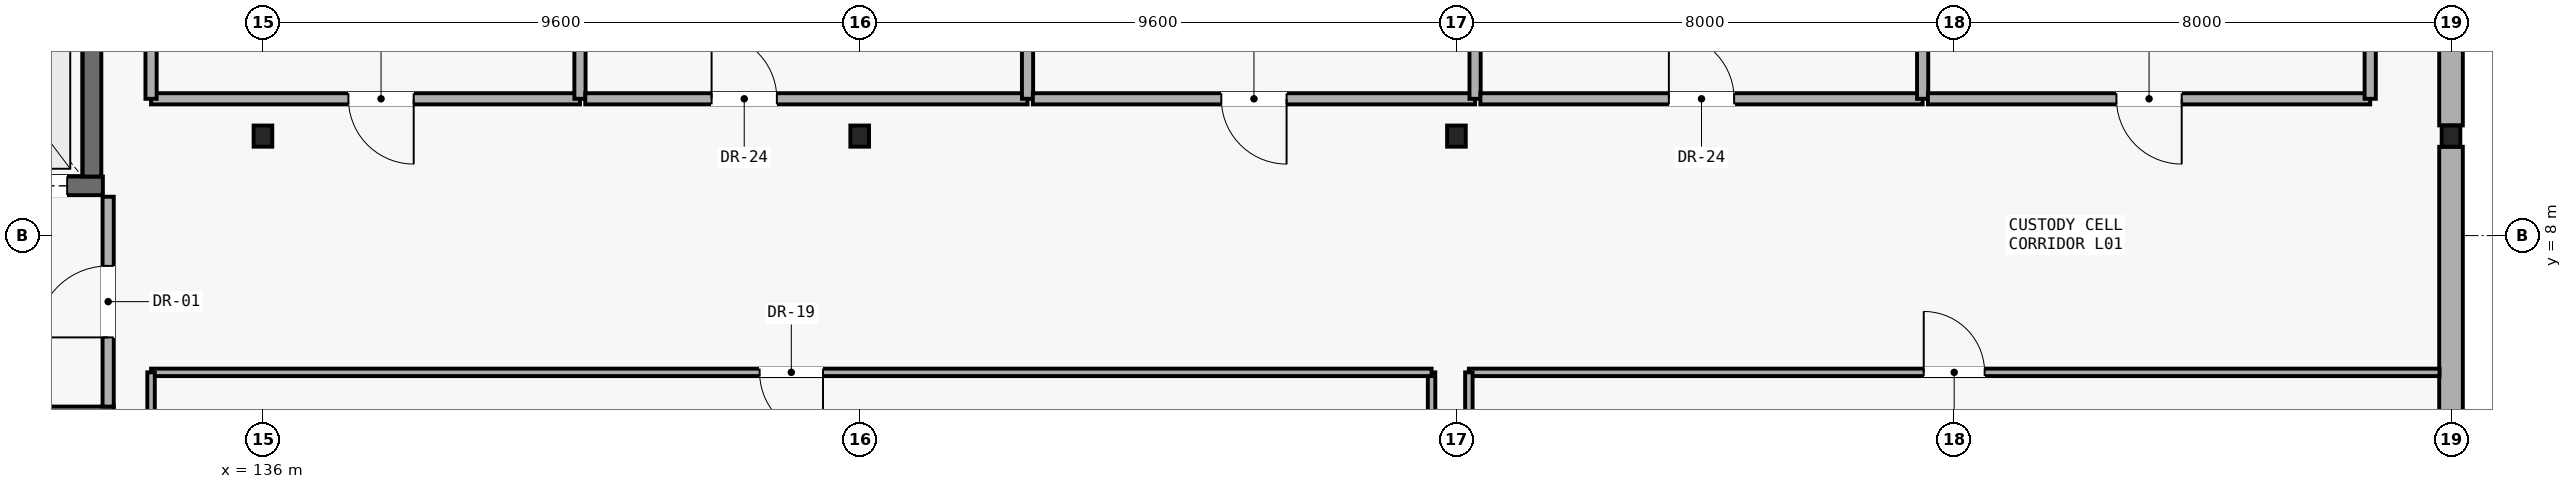
"""IFC4 building model, lengths in metres.
Left out: names, types, materials, properties, quantities, classifications, styles, units other than length and angle.
Written with IfcOpenShell. Run it as: python <this file> out.ifc"""

import sys

from ifc_helpers import new_model, si_unit, direction, frame, frame_2d, origin, origin_2d, place, context, subcontext, project, spatial, rectangle, i_section, extrude, element, fill, save


model = new_model("IFC4")
c1 = context("Model", 3, precision=1e-05, world=origin(), true_north=direction((0.0, 1.0)))
c2 = subcontext(c1, "Body", "Model", "MODEL_VIEW")
j1 = project(units=[si_unit("LENGTHUNIT", "METRE"), si_unit("PLANEANGLEUNIT", "RADIAN")], contexts=[c1])
p1 = place(None, origin())
s1 = spatial("IfcSite", under=j1, at=p1, CompositionType="ELEMENT")
p2 = place(p1, origin())
s2 = spatial("IfcBuilding", under=s1, at=p2, CompositionType="ELEMENT")
p3 = place(p2, frame((0.0, 0.0, 5.25)))
s3 = spatial("IfcBuildingStorey", under=s2, at=p3, CompositionType="ELEMENT", Elevation=5.25)
for number, where, z_axis, x_axis in (
    (1, (136.0, 9.6, 0.0), (0.0, 0.0, 1.0), (1.0, 0.0, 0.0)),
    (2, (145.6, 9.6, 0.0), (0.0, 0.0, 1.0), (1.0, 0.0, 0.0)),
    (3, (155.2, 9.6, 0.0), (0.0, 0.0, 1.0), (1.0, 0.0, 0.0)),
    (4, (171.2, 9.6, 0.0), (0.0, 0.0, 1.0), (1.0, 0.0, 0.0)),
):
    element("IfcColumn", number, at=place(p3, frame(where, z_axis=z_axis, x_axis=x_axis)), inside=s3, PredefinedType="COLUMN", context=c2, shape_type="SweptSolid", body=[
        extrude(i_section(OverallWidth=0.3, OverallDepth=0.34, WebThickness=0.012, FlangeThickness=0.021, FilletRadius=0.027, at=origin_2d()), origin(), (0.0, 0.0, 1.0), 4.2),
    ])
p4 = place(p3, frame((171.2, 0.172, 0.0), z_axis=(0.0, 0.0, 1.0), x_axis=(0.0, 1.0, 0.0)))
e5 = element("IfcWall", 5, at=p4, inside=s3, PredefinedType="SOLIDWALL", context=c2, shape_type="SweptSolid", body=[
    extrude(rectangle(XDim=9.256, YDim=0.38, at=frame_2d((4.628, 0.0))), origin(), (0.0, 0.0, 1.0), 3.5),
])
p5 = place(p3, frame((171.2, 9.772, 0.0), z_axis=(0.0, 0.0, 1.0), x_axis=(0.0, 1.0, 0.0)))
e6 = element("IfcWall", 6, at=p5, inside=s3, PredefinedType="SOLIDWALL", context=c2, shape_type="SweptSolid", body=[
    extrude(rectangle(XDim=12.456, YDim=0.38, at=frame_2d((6.228, 0.0))), origin(), (0.0, 0.0, 1.0), 3.5),
])
p6 = place(p5, frame((3.528, 0.0, 1.7)))
e7 = element("IfcOpeningElement", 7, at=p6, cuts=e6, PredefinedType="OPENING", context=c2, shape_type="SweptSolid", body=[
    extrude(rectangle(XDim=1.4, YDim=0.85, at=frame_2d((0.7, 0.425))), frame((0.0, 0.2, 0.0), z_axis=(0.0, -1.0, 0.0), x_axis=(1.0, 0.0, 0.0)), (0.0, 0.0, 1.0), 0.4),
])
p7 = place(p5, frame((8.578, 0.0, 1.7)))
e8 = element("IfcOpeningElement", 8, at=p7, cuts=e6, PredefinedType="OPENING", context=c2, shape_type="SweptSolid", body=[
    extrude(rectangle(XDim=1.4, YDim=0.85, at=frame_2d((0.7, 0.425))), frame((0.0, 0.2, 0.0), z_axis=(0.0, -1.0, 0.0), x_axis=(1.0, 0.0, 0.0)), (0.0, 0.0, 1.0), 0.4),
])
p8 = place(p3, frame((130.925, 8.8, 0.0), z_axis=(0.0, 0.0, 1.0), x_axis=(1.0, 0.0, 0.0)))
e9 = element("IfcWall", 9, at=p8, inside=s3, PredefinedType="SHEAR", context=c2, shape_type="SweptSolid", body=[
    extrude(rectangle(XDim=2.5, YDim=0.3, at=frame_2d((1.25, 0.0))), origin(), (0.0, 0.0, 1.0), 3.96),
])
p9 = place(p8, frame((0.575, 0.0, 0.0)))
e10 = element("IfcOpeningElement", 10, at=p9, cuts=e9, PredefinedType="OPENING", context=c2, shape_type="SweptSolid", body=[
    extrude(rectangle(XDim=1.35, YDim=2.15, at=frame_2d((0.675, 1.075))), frame((0.0, 0.16, 0.0), z_axis=(0.0, -1.0, 0.0), x_axis=(1.0, 0.0, 0.0)), (0.0, 0.0, 1.0), 0.32),
])
p10 = place(p3, frame((133.25, 8.95, 0.0), z_axis=(0.0, 0.0, 1.0), x_axis=(0.0, 1.0, 0.0)))
e11 = element("IfcWall", 11, at=p10, inside=s3, PredefinedType="SHEAR", context=c2, shape_type="SweptSolid", body=[
    extrude(rectangle(XDim=2.65, YDim=0.3, at=frame_2d((1.325, 0.0))), origin(), (0.0, 0.0, 1.0), 3.96),
])
p11 = place(p3, frame((127.2, 5.16, 0.0), z_axis=(0.0, 0.0, 1.0), x_axis=(1.0, 0.0, 0.0)))
e12 = element("IfcWall", 12, at=p11, inside=s3, PredefinedType="PARTITIONING", context=c2, shape_type="SweptSolid", body=[
    extrude(rectangle(XDim=6.4, YDim=0.18, at=frame_2d((3.2, 0.0))), origin(), (0.0, 0.0, 1.0), 3.96),
])
p12 = place(p3, frame((133.51, 5.25, 0.0), z_axis=(0.0, 0.0, 1.0), x_axis=(0.0, 1.0, 0.0)))
e13 = element("IfcWall", 13, at=p12, inside=s3, PredefinedType="PARTITIONING", context=c2, shape_type="SweptSolid", body=[
    extrude(rectangle(XDim=3.375, YDim=0.18, at=frame_2d((1.688, 0.0))), origin(), (0.0, 0.0, 1.0), 3.96),
])
p13 = place(p12, frame((1.113, 0.0, 0.0)))
e14 = element("IfcOpeningElement", 14, at=p13, cuts=e13, PredefinedType="OPENING", context=c2, shape_type="SweptSolid", body=[
    extrude(rectangle(XDim=1.15, YDim=2.15, at=frame_2d((0.575, 1.075))), frame((0.0, 0.1, 0.0), z_axis=(0.0, -1.0, 0.0), x_axis=(1.0, 0.0, 0.0)), (0.0, 0.0, 1.0), 0.2),
])
p14 = place(p3, frame((134.2, 10.2, 0.0), z_axis=(0.0, 0.0, 1.0), x_axis=(1.0, 0.0, 0.0)))
e15 = element("IfcWall", 15, at=p14, inside=s3, PredefinedType="PARTITIONING", context=c2, shape_type="SweptSolid", body=[
    extrude(rectangle(XDim=6.9, YDim=0.18, at=frame_2d((3.45, 0.0))), origin(), (0.0, 0.0, 1.0), 3.96),
])
p15 = place(p14, frame((3.175, 0.0, 0.0)))
e16 = element("IfcOpeningElement", 16, at=p15, cuts=e15, PredefinedType="OPENING", context=c2, shape_type="SweptSolid", body=[
    extrude(rectangle(XDim=1.05, YDim=2.1, at=frame_2d((0.525, 1.05))), frame((0.0, 0.1, 0.0), z_axis=(0.0, -1.0, 0.0), x_axis=(1.0, 0.0, 0.0)), (0.0, 0.0, 1.0), 0.2),
])
for number, where, z_axis, x_axis in (
    (17, (141.1, 10.2, 0.0), (0.0, 0.0, 1.0), (0.0, 1.0, 0.0)),
    (18, (134.2, 22.215, 0.0), (0.0, 0.0, 1.0), (0.0, -1.0, 0.0)),
):
    element("IfcWall", number, at=place(p3, frame(where, z_axis=z_axis, x_axis=x_axis)), inside=s3, PredefinedType="PARTITIONING", context=c2, shape_type="SweptSolid", body=[
        extrude(rectangle(XDim=12.015, YDim=0.18, at=frame_2d((6.008, 0.0))), origin(), (0.0, 0.0, 1.0), 3.96),
    ])
p16 = place(p3, frame((141.185, 10.2, 0.0), z_axis=(0.0, 0.0, 1.0), x_axis=(1.0, 0.0, 0.0)))
e19 = element("IfcWall", 19, at=p16, inside=s3, PredefinedType="PARTITIONING", context=c2, shape_type="SweptSolid", body=[
    extrude(rectangle(XDim=7.115, YDim=0.18, at=frame_2d((3.558, 0.0))), origin(), (0.0, 0.0, 1.0), 3.96),
])
p17 = place(p16, frame((2.032, 0.0, 0.0)))
e20 = element("IfcOpeningElement", 20, at=p17, cuts=e19, PredefinedType="OPENING", context=c2, shape_type="SweptSolid", body=[
    extrude(rectangle(XDim=1.05, YDim=2.1, at=frame_2d((0.525, 1.05))), frame((0.0, 0.1, 0.0), z_axis=(0.0, -1.0, 0.0), x_axis=(1.0, 0.0, 0.0)), (0.0, 0.0, 1.0), 0.2),
])
p18 = place(p3, frame((148.3, 10.2, 0.0), z_axis=(0.0, 0.0, 1.0), x_axis=(0.0, 1.0, 0.0)))
e21 = element("IfcWall", 21, at=p18, inside=s3, PredefinedType="PARTITIONING", context=c2, shape_type="SweptSolid", body=[
    extrude(rectangle(XDim=12.015, YDim=0.18, at=frame_2d((6.008, 0.0))), origin(), (0.0, 0.0, 1.0), 3.96),
])
p19 = place(p3, frame((148.385, 10.2, 0.0), z_axis=(0.0, 0.0, 1.0), x_axis=(1.0, 0.0, 0.0)))
e22 = element("IfcWall", 22, at=p19, inside=s3, PredefinedType="PARTITIONING", context=c2, shape_type="SweptSolid", body=[
    extrude(rectangle(XDim=7.115, YDim=0.18, at=frame_2d((3.558, 0.0))), origin(), (0.0, 0.0, 1.0), 3.96),
])
p20 = place(p19, frame((3.032, 0.0, 0.0)))
e23 = element("IfcOpeningElement", 23, at=p20, cuts=e22, PredefinedType="OPENING", context=c2, shape_type="SweptSolid", body=[
    extrude(rectangle(XDim=1.05, YDim=2.1, at=frame_2d((0.525, 1.05))), frame((0.0, 0.1, 0.0), z_axis=(0.0, -1.0, 0.0), x_axis=(1.0, 0.0, 0.0)), (0.0, 0.0, 1.0), 0.2),
])
p21 = place(p3, frame((155.5, 10.2, 0.0), z_axis=(0.0, 0.0, 1.0), x_axis=(0.0, 1.0, 0.0)))
e24 = element("IfcWall", 24, at=p21, inside=s3, PredefinedType="PARTITIONING", context=c2, shape_type="SweptSolid", body=[
    extrude(rectangle(XDim=12.015, YDim=0.18, at=frame_2d((6.008, 0.0))), origin(), (0.0, 0.0, 1.0), 3.5),
])
p22 = place(p3, frame((155.585, 10.2, 0.0), z_axis=(0.0, 0.0, 1.0), x_axis=(1.0, 0.0, 0.0)))
e25 = element("IfcWall", 25, at=p22, inside=s3, PredefinedType="PARTITIONING", context=c2, shape_type="SweptSolid", body=[
    extrude(rectangle(XDim=7.115, YDim=0.18, at=frame_2d((3.558, 0.0))), origin(), (0.0, 0.0, 1.0), 3.96),
])
p23 = place(p22, frame((3.032, 0.0, 0.0)))
e26 = element("IfcOpeningElement", 26, at=p23, cuts=e25, PredefinedType="OPENING", context=c2, shape_type="SweptSolid", body=[
    extrude(rectangle(XDim=1.05, YDim=2.1, at=frame_2d((0.525, 1.05))), frame((0.0, 0.1, 0.0), z_axis=(0.0, -1.0, 0.0), x_axis=(1.0, 0.0, 0.0)), (0.0, 0.0, 1.0), 0.2),
])
p24 = place(p3, frame((162.7, 10.2, 0.0), z_axis=(0.0, 0.0, 1.0), x_axis=(0.0, 1.0, 0.0)))
e27 = element("IfcWall", 27, at=p24, inside=s3, PredefinedType="PARTITIONING", context=c2, shape_type="SweptSolid", body=[
    extrude(rectangle(XDim=12.015, YDim=0.18, at=frame_2d((6.008, 0.0))), origin(), (0.0, 0.0, 1.0), 3.96),
])
p25 = place(p3, frame((162.785, 10.2, 0.0), z_axis=(0.0, 0.0, 1.0), x_axis=(1.0, 0.0, 0.0)))
e28 = element("IfcWall", 28, at=p25, inside=s3, PredefinedType="PARTITIONING", context=c2, shape_type="SweptSolid", body=[
    extrude(rectangle(XDim=7.115, YDim=0.18, at=frame_2d((3.558, 0.0))), origin(), (0.0, 0.0, 1.0), 3.96),
])
p26 = place(p25, frame((3.032, 0.0, 0.0)))
e29 = element("IfcOpeningElement", 29, at=p26, cuts=e28, PredefinedType="OPENING", context=c2, shape_type="SweptSolid", body=[
    extrude(rectangle(XDim=1.05, YDim=2.1, at=frame_2d((0.525, 1.05))), frame((0.0, 0.1, 0.0), z_axis=(0.0, -1.0, 0.0), x_axis=(1.0, 0.0, 0.0)), (0.0, 0.0, 1.0), 0.2),
])
p27 = place(p3, frame((169.9, 10.2, 0.0), z_axis=(0.0, 0.0, 1.0), x_axis=(0.0, 1.0, 0.0)))
e30 = element("IfcWall", 30, at=p27, inside=s3, PredefinedType="PARTITIONING", context=c2, shape_type="SweptSolid", body=[
    extrude(rectangle(XDim=12.015, YDim=0.18, at=frame_2d((6.008, 0.0))), origin(), (0.0, 0.0, 1.0), 3.96),
])
p28 = place(p3, frame((154.8, 0.185, 0.0), z_axis=(0.0, 0.0, 1.0), x_axis=(0.0, 1.0, 0.0)))
e31 = element("IfcWall", 31, at=p28, inside=s3, PredefinedType="PARTITIONING", context=c2, shape_type="SweptSolid", body=[
    extrude(rectangle(XDim=5.615, YDim=0.12, at=frame_2d((2.808, 0.0))), origin(), (0.0, 0.0, 1.0), 3.96),
])
p29 = place(p3, frame((154.8, 5.8, 0.0), z_axis=(0.0, 0.0, 1.0), x_axis=(-1.0, 0.0, 0.0)))
e32 = element("IfcWall", 32, at=p29, inside=s3, PredefinedType="PARTITIONING", context=c2, shape_type="SweptSolid", body=[
    extrude(rectangle(XDim=20.6, YDim=0.12, at=frame_2d((10.3, 0.0))), origin(), (0.0, 0.0, 1.0), 3.96),
])
p30 = place(p29, frame((9.79, 0.0, 0.0)))
e33 = element("IfcOpeningElement", 33, at=p30, cuts=e32, PredefinedType="OPENING", context=c2, shape_type="SweptSolid", body=[
    extrude(rectangle(XDim=1.02, YDim=2.1, at=frame_2d((0.51, 1.05))), frame((0.0, 0.07, 0.0), z_axis=(0.0, -1.0, 0.0), x_axis=(1.0, 0.0, 0.0)), (0.0, 0.0, 1.0), 0.14),
])
p31 = place(p3, frame((134.2, 5.8, 0.0), z_axis=(0.0, 0.0, 1.0), x_axis=(0.0, -1.0, 0.0)))
e34 = element("IfcWall", 34, at=p31, inside=s3, PredefinedType="PARTITIONING", context=c2, shape_type="SweptSolid", body=[
    extrude(rectangle(XDim=5.615, YDim=0.12, at=frame_2d((2.808, 0.0))), origin(), (0.0, 0.0, 1.0), 3.96),
])
p32 = place(p3, frame((171.015, 5.8, 0.0), z_axis=(0.0, 0.0, 1.0), x_axis=(-1.0, 0.0, 0.0)))
e35 = element("IfcWall", 35, at=p32, inside=s3, PredefinedType="PARTITIONING", context=c2, shape_type="SweptSolid", body=[
    extrude(rectangle(XDim=15.615, YDim=0.12, at=frame_2d((7.808, 0.0))), origin(), (0.0, 0.0, 1.0), 3.96),
])
p33 = place(p32, frame((7.317, 0.0, 0.0)))
e36 = element("IfcOpeningElement", 36, at=p33, cuts=e35, PredefinedType="OPENING", context=c2, shape_type="SweptSolid", body=[
    extrude(rectangle(XDim=0.98, YDim=2.1, at=frame_2d((0.49, 1.05))), frame((0.0, 0.07, 0.0), z_axis=(0.0, -1.0, 0.0), x_axis=(1.0, 0.0, 0.0)), (0.0, 0.0, 1.0), 0.14),
])
p34 = place(p3, frame((155.4, 5.8, 0.0), z_axis=(0.0, 0.0, 1.0), x_axis=(0.0, -1.0, 0.0)))
e37 = element("IfcWall", 37, at=p34, inside=s3, PredefinedType="PARTITIONING", context=c2, shape_type="SweptSolid", body=[
    extrude(rectangle(XDim=5.615, YDim=0.12, at=frame_2d((2.808, 0.0))), origin(), (0.0, 0.0, 1.0), 3.5),
])
p35 = place(p9, frame((1.35, 0.0, 0.0), z_axis=(0.0, 0.0, 1.0), x_axis=(-1.0, 0.0, 0.0)))
e38 = element("IfcDoor", 38, at=p35, inside=s3, OperationType="SLIDING_TO_RIGHT", PredefinedType="DOOR", context=c2, shape_type="SweptSolid", body=[
    extrude(rectangle(XDim=1.35, YDim=2.15, at=frame_2d((0.675, 1.075))), frame((0.0, 0.025, 0.0), z_axis=(0.0, -1.0, 0.0), x_axis=(1.0, 0.0, 0.0)), (0.0, 0.0, 1.0), 0.05),
])
fill(e10, e38)
p36 = place(p13, origin())
e39 = element("IfcDoor", 39, at=p36, inside=s3, OperationType="SINGLE_SWING_LEFT", PredefinedType="DOOR", context=c2, shape_type="SweptSolid", body=[
    extrude(rectangle(XDim=1.15, YDim=2.15, at=frame_2d((0.575, 1.075))), frame((0.0, 0.025, 0.0), z_axis=(0.0, -1.0, 0.0), x_axis=(1.0, 0.0, 0.0)), (0.0, 0.0, 1.0), 0.05),
])
fill(e14, e39)
p37 = place(p15, frame((1.05, 0.0, 0.0), z_axis=(0.0, 0.0, 1.0), x_axis=(-1.0, 0.0, 0.0)))
e40 = element("IfcDoor", 40, at=p37, inside=s3, OperationType="SINGLE_SWING_RIGHT", PredefinedType="DOOR", context=c2, shape_type="SweptSolid", body=[
    extrude(rectangle(XDim=1.05, YDim=2.1, at=frame_2d((0.525, 1.05))), frame((0.0, 0.025, 0.0), z_axis=(0.0, -1.0, 0.0), x_axis=(1.0, 0.0, 0.0)), (0.0, 0.0, 1.0), 0.05),
])
fill(e16, e40)
p38 = place(p17, origin())
e41 = element("IfcDoor", 41, at=p38, inside=s3, OperationType="SINGLE_SWING_LEFT", PredefinedType="DOOR", context=c2, shape_type="SweptSolid", body=[
    extrude(rectangle(XDim=1.05, YDim=2.1, at=frame_2d((0.525, 1.05))), frame((0.0, 0.025, 0.0), z_axis=(0.0, -1.0, 0.0), x_axis=(1.0, 0.0, 0.0)), (0.0, 0.0, 1.0), 0.05),
])
fill(e20, e41)
p39 = place(p20, frame((1.05, 0.0, 0.0), z_axis=(0.0, 0.0, 1.0), x_axis=(-1.0, 0.0, 0.0)))
e42 = element("IfcDoor", 42, at=p39, inside=s3, OperationType="SINGLE_SWING_RIGHT", PredefinedType="DOOR", context=c2, shape_type="SweptSolid", body=[
    extrude(rectangle(XDim=1.05, YDim=2.1, at=frame_2d((0.525, 1.05))), frame((0.0, 0.025, 0.0), z_axis=(0.0, -1.0, 0.0), x_axis=(1.0, 0.0, 0.0)), (0.0, 0.0, 1.0), 0.05),
])
fill(e23, e42)
p40 = place(p23, origin())
e43 = element("IfcDoor", 43, at=p40, inside=s3, OperationType="SINGLE_SWING_LEFT", PredefinedType="DOOR", context=c2, shape_type="SweptSolid", body=[
    extrude(rectangle(XDim=1.05, YDim=2.1, at=frame_2d((0.525, 1.05))), frame((0.0, 0.025, 0.0), z_axis=(0.0, -1.0, 0.0), x_axis=(1.0, 0.0, 0.0)), (0.0, 0.0, 1.0), 0.05),
])
fill(e26, e43)
p41 = place(p26, frame((1.05, 0.0, 0.0), z_axis=(0.0, 0.0, 1.0), x_axis=(-1.0, 0.0, 0.0)))
e44 = element("IfcDoor", 44, at=p41, inside=s3, OperationType="SINGLE_SWING_RIGHT", PredefinedType="DOOR", context=c2, shape_type="SweptSolid", body=[
    extrude(rectangle(XDim=1.05, YDim=2.1, at=frame_2d((0.525, 1.05))), frame((0.0, 0.025, 0.0), z_axis=(0.0, -1.0, 0.0), x_axis=(1.0, 0.0, 0.0)), (0.0, 0.0, 1.0), 0.05),
])
fill(e29, e44)
p42 = place(p30, origin())
e45 = element("IfcDoor", 45, at=p42, inside=s3, OperationType="SINGLE_SWING_LEFT", PredefinedType="DOOR", context=c2, shape_type="SweptSolid", body=[
    extrude(rectangle(XDim=1.02, YDim=2.1, at=frame_2d((0.51, 1.05))), frame((0.0, 0.025, 0.0), z_axis=(0.0, -1.0, 0.0), x_axis=(1.0, 0.0, 0.0)), (0.0, 0.0, 1.0), 0.05),
])
fill(e33, e45)
p43 = place(p33, frame((0.98, 0.0, 0.0), z_axis=(0.0, 0.0, 1.0), x_axis=(-1.0, 0.0, 0.0)))
e46 = element("IfcDoor", 46, at=p43, inside=s3, OperationType="SINGLE_SWING_RIGHT", PredefinedType="DOOR", context=c2, shape_type="SweptSolid", body=[
    extrude(rectangle(XDim=0.98, YDim=2.1, at=frame_2d((0.49, 1.05))), frame((0.0, 0.025, 0.0), z_axis=(0.0, -1.0, 0.0), x_axis=(1.0, 0.0, 0.0)), (0.0, 0.0, 1.0), 0.05),
])
fill(e36, e46)
save(model, sys.argv[1])
